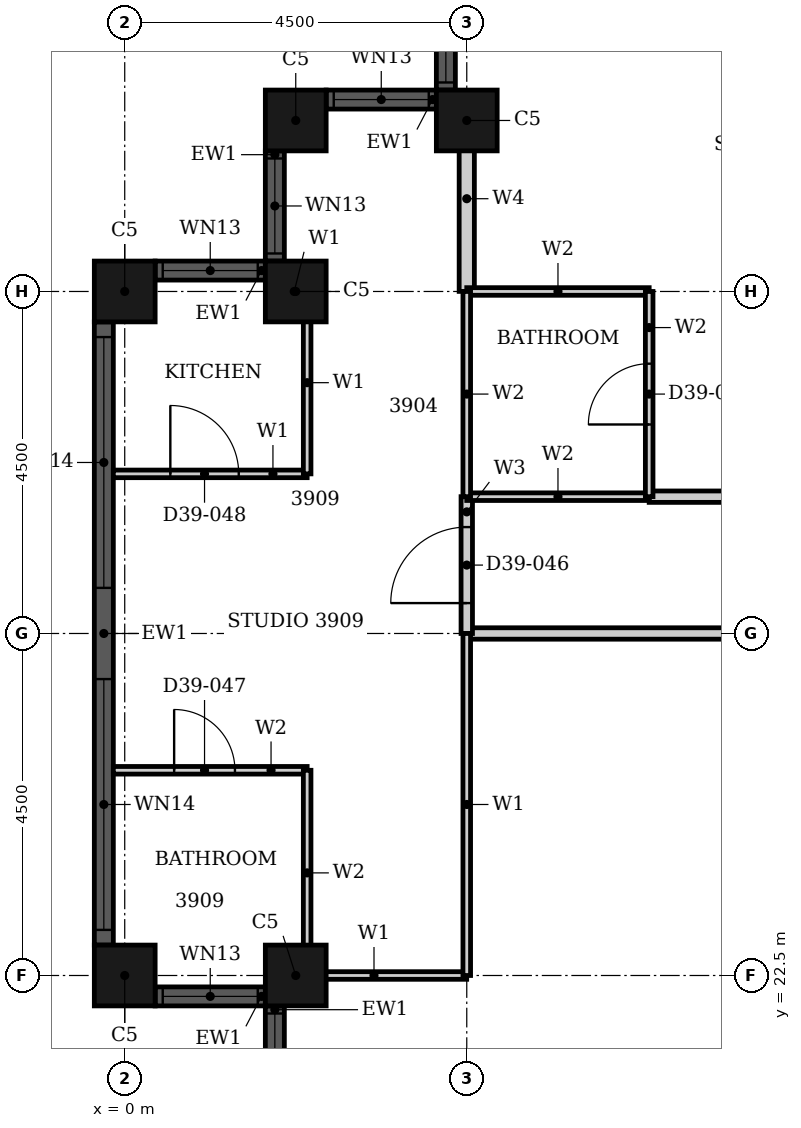
"""IFC4 building model, lengths in metres.
Left out: names, types, materials, properties, quantities, classifications, styles, units other than length and angle.
Written with IfcOpenShell. Run it as: python <this file> out.ifc"""

import sys

from ifc_helpers import new_model, si_unit, direction, frame, frame_2d, origin, origin_2d, place, context, subcontext, project, spatial, rectangle, hollow_rectangle, extrude, element, fill, save


model = new_model("IFC4")
c1 = context("Model", 3, precision=1e-05, world=origin(), true_north=direction((0.0, 1.0)))
c2 = subcontext(c1, "Body", "Model", "MODEL_VIEW")
j1 = project(units=[si_unit("LENGTHUNIT", "METRE"), si_unit("PLANEANGLEUNIT", "RADIAN")], contexts=[c1])
p1 = place(None, origin())
s1 = spatial("IfcSite", under=j1, at=p1, CompositionType="ELEMENT")
p2 = place(p1, origin())
s2 = spatial("IfcBuilding", under=s1, at=p2, CompositionType="ELEMENT")
p3 = place(p2, frame((0.0, 0.0, 158.0)))
s3 = spatial("IfcBuildingStorey", under=s2, at=p3, CompositionType="ELEMENT", Elevation=158.0)
for number, where, z_axis, x_axis in (
    (1, (4.5, 33.75, 0.0), (0.0, 0.0, 1.0), (1.0, 0.0, 0.0)),
    (2, (2.25, 33.75, 0.0), (0.0, 0.0, 1.0), (1.0, 0.0, 0.0)),
    (3, (2.25, 31.5, 0.0), (0.0, 0.0, 1.0), (1.0, 0.0, 0.0)),
    (4, (0.0, 31.5, 0.0), (0.0, 0.0, 1.0), (1.0, 0.0, 0.0)),
    (5, (0.0, 22.5, 0.0), (0.0, 0.0, 1.0), (1.0, 0.0, 0.0)),
    (6, (2.25, 22.5, 0.0), (0.0, 0.0, 1.0), (1.0, 0.0, 0.0)),
):
    element("IfcColumn", number, at=place(p3, frame(where, z_axis=z_axis, x_axis=x_axis)), inside=s3, PredefinedType="COLUMN", context=c2, shape_type="SweptSolid", body=[
        extrude(hollow_rectangle(XDim=0.8, YDim=0.8, WallThickness=0.025, at=origin_2d()), origin(), (0.0, 0.0, 1.0), 3.7),
    ])
p4 = place(p3, frame((4.225, 35.6, 0.0), z_axis=(0.0, 0.0, 1.0), x_axis=(0.0, -1.0, 0.0)))
e7 = element("IfcWall", 7, at=p4, inside=s3, PredefinedType="SOLIDWALL", context=c2, shape_type="SweptSolid", body=[
    extrude(rectangle(XDim=1.45, YDim=0.25, at=frame_2d((0.725, 0.0))), origin(), (0.0, 0.0, 1.0), 3.7),
])
p5 = place(p4, frame((0.1, 0.0, 0.9)))
e8 = element("IfcOpeningElement", 8, at=p5, cuts=e7, PredefinedType="OPENING", context=c2, shape_type="SweptSolid", body=[
    extrude(rectangle(XDim=1.25, YDim=2.08, at=frame_2d((0.625, 1.04))), frame((0.0, 0.135, 0.0), z_axis=(0.0, -1.0, 0.0), x_axis=(1.0, 0.0, 0.0)), (0.0, 0.0, 1.0), 0.27),
])
p6 = place(p3, frame((4.1, 34.025, 0.0), z_axis=(0.0, 0.0, 1.0), x_axis=(-1.0, 0.0, 0.0)))
e9 = element("IfcWall", 9, at=p6, inside=s3, PredefinedType="SOLIDWALL", context=c2, shape_type="SweptSolid", body=[
    extrude(rectangle(XDim=1.45, YDim=0.25, at=frame_2d((0.725, 0.0))), origin(), (0.0, 0.0, 1.0), 3.7),
])
p7 = place(p6, frame((0.1, 0.0, 0.9)))
e10 = element("IfcOpeningElement", 10, at=p7, cuts=e9, PredefinedType="OPENING", context=c2, shape_type="SweptSolid", body=[
    extrude(rectangle(XDim=1.25, YDim=1.85, at=frame_2d((0.625, 0.925))), frame((0.0, 0.135, 0.0), z_axis=(0.0, -1.0, 0.0), x_axis=(1.0, 0.0, 0.0)), (0.0, 0.0, 1.0), 0.27),
])
p8 = place(p3, frame((1.975, 33.35, 0.0), z_axis=(0.0, 0.0, 1.0), x_axis=(0.0, -1.0, 0.0)))
e11 = element("IfcWall", 11, at=p8, inside=s3, PredefinedType="SOLIDWALL", context=c2, shape_type="SweptSolid", body=[
    extrude(rectangle(XDim=1.45, YDim=0.25, at=frame_2d((0.725, 0.0))), origin(), (0.0, 0.0, 1.0), 3.7),
])
p9 = place(p8, frame((0.1, 0.0, 0.9)))
e12 = element("IfcOpeningElement", 12, at=p9, cuts=e11, PredefinedType="OPENING", context=c2, shape_type="SweptSolid", body=[
    extrude(rectangle(XDim=1.25, YDim=1.85, at=frame_2d((0.625, 0.925))), frame((0.0, 0.135, 0.0), z_axis=(0.0, -1.0, 0.0), x_axis=(1.0, 0.0, 0.0)), (0.0, 0.0, 1.0), 0.27),
])
p10 = place(p3, frame((1.85, 31.775, 0.0), z_axis=(0.0, 0.0, 1.0), x_axis=(-1.0, 0.0, 0.0)))
e13 = element("IfcWall", 13, at=p10, inside=s3, PredefinedType="SOLIDWALL", context=c2, shape_type="SweptSolid", body=[
    extrude(rectangle(XDim=1.45, YDim=0.25, at=frame_2d((0.725, 0.0))), origin(), (0.0, 0.0, 1.0), 3.7),
])
p11 = place(p10, frame((0.1, 0.0, 0.9)))
e14 = element("IfcOpeningElement", 14, at=p11, cuts=e13, PredefinedType="OPENING", context=c2, shape_type="SweptSolid", body=[
    extrude(rectangle(XDim=1.25, YDim=1.85, at=frame_2d((0.625, 0.925))), frame((0.0, 0.135, 0.0), z_axis=(0.0, -1.0, 0.0), x_axis=(1.0, 0.0, 0.0)), (0.0, 0.0, 1.0), 0.27),
])
p12 = place(p3, frame((-0.275, 31.1, 0.0), z_axis=(0.0, 0.0, 1.0), x_axis=(0.0, -1.0, 0.0)))
e15 = element("IfcWall", 15, at=p12, inside=s3, PredefinedType="SOLIDWALL", context=c2, shape_type="SweptSolid", body=[
    extrude(rectangle(XDim=8.2, YDim=0.25, at=frame_2d((4.1, 0.0))), origin(), (0.0, 0.0, 1.0), 3.7),
])
p13 = place(p12, frame((0.2, 0.0, 0.45)))
e16 = element("IfcOpeningElement", 16, at=p13, cuts=e15, PredefinedType="OPENING", context=c2, shape_type="SweptSolid", body=[
    extrude(rectangle(XDim=3.3, YDim=2.53, at=frame_2d((1.65, 1.265))), frame((0.0, 0.135, 0.0), z_axis=(0.0, -1.0, 0.0), x_axis=(1.0, 0.0, 0.0)), (0.0, 0.0, 1.0), 0.27),
])
p14 = place(p12, frame((4.7, 0.0, 0.45)))
e17 = element("IfcOpeningElement", 17, at=p14, cuts=e15, PredefinedType="OPENING", context=c2, shape_type="SweptSolid", body=[
    extrude(rectangle(XDim=3.3, YDim=2.53, at=frame_2d((1.65, 1.265))), frame((0.0, 0.135, 0.0), z_axis=(0.0, -1.0, 0.0), x_axis=(1.0, 0.0, 0.0)), (0.0, 0.0, 1.0), 0.27),
])
p15 = place(p3, frame((0.4, 22.225, 0.0), z_axis=(0.0, 0.0, 1.0), x_axis=(1.0, 0.0, 0.0)))
e18 = element("IfcWall", 18, at=p15, inside=s3, PredefinedType="SOLIDWALL", context=c2, shape_type="SweptSolid", body=[
    extrude(rectangle(XDim=1.45, YDim=0.25, at=frame_2d((0.725, 0.0))), origin(), (0.0, 0.0, 1.0), 3.7),
])
p16 = place(p15, frame((0.1, 0.0, 0.9)))
e19 = element("IfcOpeningElement", 19, at=p16, cuts=e18, PredefinedType="OPENING", context=c2, shape_type="SweptSolid", body=[
    extrude(rectangle(XDim=1.25, YDim=1.85, at=frame_2d((0.625, 0.925))), frame((0.0, 0.135, 0.0), z_axis=(0.0, -1.0, 0.0), x_axis=(1.0, 0.0, 0.0)), (0.0, 0.0, 1.0), 0.27),
])
p17 = place(p3, frame((1.975, 22.1, 0.0), z_axis=(0.0, 0.0, 1.0), x_axis=(0.0, -1.0, 0.0)))
e20 = element("IfcWall", 20, at=p17, inside=s3, PredefinedType="SOLIDWALL", context=c2, shape_type="SweptSolid", body=[
    extrude(rectangle(XDim=1.45, YDim=0.25, at=frame_2d((0.725, 0.0))), origin(), (0.0, 0.0, 1.0), 3.7),
])
p18 = place(p17, frame((0.1, 0.0, 0.9)))
e21 = element("IfcOpeningElement", 21, at=p18, cuts=e20, PredefinedType="OPENING", context=c2, shape_type="SweptSolid", body=[
    extrude(rectangle(XDim=1.25, YDim=1.85, at=frame_2d((0.625, 0.925))), frame((0.0, 0.135, 0.0), z_axis=(0.0, -1.0, 0.0), x_axis=(1.0, 0.0, 0.0)), (0.0, 0.0, 1.0), 0.27),
])
p19 = place(p3, frame((4.5, 27.0, 0.0), z_axis=(0.0, 0.0, 1.0), x_axis=(1.0, 0.0, 0.0)))
e22 = element("IfcWall", 22, at=p19, inside=s3, PredefinedType="PARTITIONING", context=c2, shape_type="SweptSolid", body=[
    extrude(rectangle(XDim=13.5, YDim=0.15, at=frame_2d((6.75, 0.0))), origin(), (0.0, 0.0, 1.0), 2.68),
])
p20 = place(p19, frame((5.35, 0.0, 0.0)))
e23 = element("IfcOpeningElement", 23, at=p20, cuts=e22, PredefinedType="OPENING", context=c2, shape_type="SweptSolid", body=[
    extrude(rectangle(XDim=1.0, YDim=2.1, at=frame_2d((0.5, 1.05))), frame((0.0, 0.085, 0.0), z_axis=(0.0, -1.0, 0.0), x_axis=(1.0, 0.0, 0.0)), (0.0, 0.0, 1.0), 0.17),
])
p21 = place(p3, frame((6.9, 28.8, 0.0), z_axis=(0.0, 0.0, 1.0), x_axis=(1.0, 0.0, 0.0)))
e24 = element("IfcWall", 24, at=p21, inside=s3, PredefinedType="PARTITIONING", context=c2, shape_type="SweptSolid", body=[
    extrude(rectangle(XDim=9.299, YDim=0.15, at=frame_2d((4.649, 0.0))), origin(), (0.0, 0.0, 1.0), 3.4),
])
p22 = place(p3, frame((4.5, 27.0, 0.0), z_axis=(0.0, 0.0, 1.0), x_axis=(0.0, 1.0, 0.0)))
e25 = element("IfcWall", 25, at=p22, inside=s3, PredefinedType="PARTITIONING", context=c2, shape_type="SweptSolid", body=[
    extrude(rectangle(XDim=1.8, YDim=0.15, at=frame_2d((0.9, 0.0))), origin(), (0.0, 0.0, 1.0), 3.4),
])
p23 = place(p22, frame((0.4, 0.0, 0.0)))
e26 = element("IfcOpeningElement", 26, at=p23, cuts=e25, PredefinedType="OPENING", context=c2, shape_type="SweptSolid", body=[
    extrude(rectangle(XDim=1.0, YDim=2.2, at=frame_2d((0.5, 1.1))), frame((0.0, 0.085, 0.0), z_axis=(0.0, -1.0, 0.0), x_axis=(1.0, 0.0, 0.0)), (0.0, 0.0, 1.0), 0.17),
])
p24 = place(p3, frame((2.06, 22.5, 0.0), z_axis=(0.0, 0.0, 1.0), x_axis=(1.0, 0.0, 0.0)))
e27 = element("IfcWall", 27, at=p24, inside=s3, PredefinedType="PARTITIONING", context=c2, shape_type="SweptSolid", body=[
    extrude(rectangle(XDim=2.439, YDim=0.1, at=frame_2d((1.219, 0.0))), origin(), (0.0, 0.0, 1.0), 2.68),
])
p25 = place(p3, frame((-0.15, 29.1, 0.0), z_axis=(0.0, 0.0, 1.0), x_axis=(1.0, 0.0, 0.0)))
e28 = element("IfcWall", 28, at=p25, inside=s3, PredefinedType="PARTITIONING", context=c2, shape_type="SweptSolid", body=[
    extrude(rectangle(XDim=2.55, YDim=0.1, at=frame_2d((1.275, 0.0))), origin(), (0.0, 0.0, 1.0), 3.4),
])
p26 = place(p25, frame((0.75, 0.0, 0.0)))
e29 = element("IfcOpeningElement", 29, at=p26, cuts=e28, PredefinedType="OPENING", context=c2, shape_type="SweptSolid", body=[
    extrude(rectangle(XDim=0.9, YDim=2.1, at=frame_2d((0.45, 1.05))), frame((0.0, 0.06, 0.0), z_axis=(0.0, -1.0, 0.0), x_axis=(1.0, 0.0, 0.0)), (0.0, 0.0, 1.0), 0.12),
])
p27 = place(p3, frame((2.06, 31.5, 0.0), z_axis=(0.0, 0.0, 1.0), x_axis=(1.0, 0.0, 0.0)))
e30 = element("IfcWall", 30, at=p27, inside=s3, PredefinedType="PARTITIONING", context=c2, shape_type="SweptSolid", body=[
    extrude(rectangle(XDim=0.34, YDim=0.1, at=frame_2d((0.17, 0.0))), origin(), (0.0, 0.0, 1.0), 3.4),
])
p28 = place(p3, frame((2.4, 29.1, 0.0), z_axis=(0.0, 0.0, 1.0), x_axis=(0.0, 1.0, 0.0)))
e31 = element("IfcWall", 31, at=p28, inside=s3, PredefinedType="PARTITIONING", context=c2, shape_type="SweptSolid", body=[
    extrude(rectangle(XDim=2.4, YDim=0.1, at=frame_2d((1.2, 0.0))), origin(), (0.0, 0.0, 1.0), 3.4),
])
p29 = place(p3, frame((4.5, 22.5, 0.0), z_axis=(0.0, 0.0, 1.0), x_axis=(0.0, 1.0, 0.0)))
e32 = element("IfcWall", 32, at=p29, inside=s3, PredefinedType="PARTITIONING", context=c2, shape_type="SweptSolid", body=[
    extrude(rectangle(XDim=4.5, YDim=0.1, at=frame_2d((2.25, 0.0))), origin(), (0.0, 0.0, 1.0), 3.4),
])
p30 = place(p3, frame((4.5, 31.501, 0.0), z_axis=(0.0, 0.0, 1.0), x_axis=(0.0, 1.0, 0.0)))
e33 = element("IfcWall", 33, at=p30, inside=s3, PredefinedType="PARTITIONING", context=c2, shape_type="SweptSolid", body=[
    extrude(rectangle(XDim=2.439, YDim=0.2, at=frame_2d((1.219, 0.0))), origin(), (0.0, 0.0, 1.0), 3.4),
])
p31 = place(p3, frame((-0.15, 25.2, 0.0), z_axis=(0.0, 0.0, 1.0), x_axis=(1.0, 0.0, 0.0)))
e34 = element("IfcWall", 34, at=p31, inside=s3, PredefinedType="PARTITIONING", context=c2, shape_type="SweptSolid", body=[
    extrude(rectangle(XDim=2.55, YDim=0.1, at=frame_2d((1.275, 0.0))), origin(), (0.0, 0.0, 1.0), 3.4),
])
p32 = place(p31, frame((0.8, 0.0, 0.0)))
e35 = element("IfcOpeningElement", 35, at=p32, cuts=e34, PredefinedType="OPENING", context=c2, shape_type="SweptSolid", body=[
    extrude(rectangle(XDim=0.8, YDim=2.1, at=frame_2d((0.4, 1.05))), frame((0.0, 0.06, 0.0), z_axis=(0.0, -1.0, 0.0), x_axis=(1.0, 0.0, 0.0)), (0.0, 0.0, 1.0), 0.12),
])
p33 = place(p3, frame((4.5, 28.8, 0.0), z_axis=(0.0, 0.0, 1.0), x_axis=(1.0, 0.0, 0.0)))
e36 = element("IfcWall", 36, at=p33, inside=s3, PredefinedType="PARTITIONING", context=c2, shape_type="SweptSolid", body=[
    extrude(rectangle(XDim=2.4, YDim=0.1, at=frame_2d((1.2, 0.0))), origin(), (0.0, 0.0, 1.0), 3.4),
])
p34 = place(p3, frame((4.5, 31.5, 0.0), z_axis=(0.0, 0.0, 1.0), x_axis=(1.0, 0.0, 0.0)))
e37 = element("IfcWall", 37, at=p34, inside=s3, PredefinedType="PARTITIONING", context=c2, shape_type="SweptSolid", body=[
    extrude(rectangle(XDim=2.4, YDim=0.1, at=frame_2d((1.2, 0.0))), origin(), (0.0, 0.0, 1.0), 2.68),
])
for number, where, z_axis, x_axis in (
    (38, (2.4, 22.5, 0.0), (0.0, 0.0, 1.0), (0.0, 1.0, 0.0)),
    (39, (4.5, 28.8, 0.0), (0.0, 0.0, 1.0), (0.0, 1.0, 0.0)),
):
    element("IfcWall", number, at=place(p3, frame(where, z_axis=z_axis, x_axis=x_axis)), inside=s3, PredefinedType="PARTITIONING", context=c2, shape_type="SweptSolid", body=[
        extrude(rectangle(XDim=2.7, YDim=0.1, at=frame_2d((1.35, 0.0))), origin(), (0.0, 0.0, 1.0), 3.4),
    ])
p35 = place(p3, frame((6.9, 28.8, 0.0), z_axis=(0.0, 0.0, 1.0), x_axis=(0.0, 1.0, 0.0)))
e40 = element("IfcWall", 40, at=p35, inside=s3, PredefinedType="PARTITIONING", context=c2, shape_type="SweptSolid", body=[
    extrude(rectangle(XDim=2.7, YDim=0.1, at=frame_2d((1.35, 0.0))), origin(), (0.0, 0.0, 1.0), 3.4),
])
p36 = place(p35, frame((0.95, 0.0, 0.0)))
e41 = element("IfcOpeningElement", 41, at=p36, cuts=e40, PredefinedType="OPENING", context=c2, shape_type="SweptSolid", body=[
    extrude(rectangle(XDim=0.8, YDim=2.1, at=frame_2d((0.4, 1.05))), frame((0.0, 0.06, 0.0), z_axis=(0.0, -1.0, 0.0), x_axis=(1.0, 0.0, 0.0)), (0.0, 0.0, 1.0), 0.12),
])
p37 = place(p5, origin())
e42 = element("IfcWindow", 42, at=p37, inside=s3, PartitioningType="SINGLE_PANEL", PredefinedType="WINDOW", context=c2, shape_type="SweptSolid", body=[
    extrude(rectangle(XDim=1.25, YDim=2.08, at=frame_2d((0.625, 1.04))), frame((0.0, 0.03, 0.0), z_axis=(0.0, -1.0, 0.0), x_axis=(1.0, 0.0, 0.0)), (0.0, 0.0, 1.0), 0.06),
])
fill(e8, e42)
p38 = place(p7, origin())
e43 = element("IfcWindow", 43, at=p38, inside=s3, PartitioningType="SINGLE_PANEL", PredefinedType="WINDOW", context=c2, shape_type="SweptSolid", body=[
    extrude(rectangle(XDim=1.25, YDim=1.85, at=frame_2d((0.625, 0.925))), frame((0.0, 0.03, 0.0), z_axis=(0.0, -1.0, 0.0), x_axis=(1.0, 0.0, 0.0)), (0.0, 0.0, 1.0), 0.06),
])
fill(e10, e43)
p39 = place(p9, origin())
e44 = element("IfcWindow", 44, at=p39, inside=s3, PartitioningType="SINGLE_PANEL", PredefinedType="WINDOW", context=c2, shape_type="SweptSolid", body=[
    extrude(rectangle(XDim=1.25, YDim=1.85, at=frame_2d((0.625, 0.925))), frame((0.0, 0.03, 0.0), z_axis=(0.0, -1.0, 0.0), x_axis=(1.0, 0.0, 0.0)), (0.0, 0.0, 1.0), 0.06),
])
fill(e12, e44)
p40 = place(p11, origin())
e45 = element("IfcWindow", 45, at=p40, inside=s3, PartitioningType="SINGLE_PANEL", PredefinedType="WINDOW", context=c2, shape_type="SweptSolid", body=[
    extrude(rectangle(XDim=1.25, YDim=1.85, at=frame_2d((0.625, 0.925))), frame((0.0, 0.03, 0.0), z_axis=(0.0, -1.0, 0.0), x_axis=(1.0, 0.0, 0.0)), (0.0, 0.0, 1.0), 0.06),
])
fill(e14, e45)
p41 = place(p13, origin())
e46 = element("IfcWindow", 46, at=p41, inside=s3, PartitioningType="SINGLE_PANEL", PredefinedType="WINDOW", context=c2, shape_type="SweptSolid", body=[
    extrude(rectangle(XDim=3.3, YDim=2.53, at=frame_2d((1.65, 1.265))), frame((0.0, 0.03, 0.0), z_axis=(0.0, -1.0, 0.0), x_axis=(1.0, 0.0, 0.0)), (0.0, 0.0, 1.0), 0.06),
])
fill(e16, e46)
p42 = place(p14, origin())
e47 = element("IfcWindow", 47, at=p42, inside=s3, PartitioningType="SINGLE_PANEL", PredefinedType="WINDOW", context=c2, shape_type="SweptSolid", body=[
    extrude(rectangle(XDim=3.3, YDim=2.53, at=frame_2d((1.65, 1.265))), frame((0.0, 0.03, 0.0), z_axis=(0.0, -1.0, 0.0), x_axis=(1.0, 0.0, 0.0)), (0.0, 0.0, 1.0), 0.06),
])
fill(e17, e47)
p43 = place(p16, origin())
e48 = element("IfcWindow", 48, at=p43, inside=s3, PartitioningType="SINGLE_PANEL", PredefinedType="WINDOW", context=c2, shape_type="SweptSolid", body=[
    extrude(rectangle(XDim=1.25, YDim=1.85, at=frame_2d((0.625, 0.925))), frame((0.0, 0.03, 0.0), z_axis=(0.0, -1.0, 0.0), x_axis=(1.0, 0.0, 0.0)), (0.0, 0.0, 1.0), 0.06),
])
fill(e19, e48)
p44 = place(p18, origin())
e49 = element("IfcWindow", 49, at=p44, inside=s3, PartitioningType="SINGLE_PANEL", PredefinedType="WINDOW", context=c2, shape_type="SweptSolid", body=[
    extrude(rectangle(XDim=1.25, YDim=1.85, at=frame_2d((0.625, 0.925))), frame((0.0, 0.03, 0.0), z_axis=(0.0, -1.0, 0.0), x_axis=(1.0, 0.0, 0.0)), (0.0, 0.0, 1.0), 0.06),
])
fill(e21, e49)
p45 = place(p36, origin())
e50 = element("IfcDoor", 50, at=p45, inside=s3, OperationType="SINGLE_SWING_RIGHT", PredefinedType="DOOR", context=c2, shape_type="SweptSolid", body=[
    extrude(rectangle(XDim=0.8, YDim=2.1, at=frame_2d((0.4, 1.05))), frame((0.0, 0.025, 0.0), z_axis=(0.0, -1.0, 0.0), x_axis=(1.0, 0.0, 0.0)), (0.0, 0.0, 1.0), 0.05),
])
fill(e41, e50)
p46 = place(p23, origin())
e51 = element("IfcDoor", 51, at=p46, inside=s3, OperationType="SINGLE_SWING_RIGHT", PredefinedType="DOOR", context=c2, shape_type="SweptSolid", body=[
    extrude(rectangle(XDim=1.0, YDim=2.2, at=frame_2d((0.5, 1.1))), frame((0.0, 0.025, 0.0), z_axis=(0.0, -1.0, 0.0), x_axis=(1.0, 0.0, 0.0)), (0.0, 0.0, 1.0), 0.05),
])
fill(e26, e51)
p47 = place(p32, origin())
e52 = element("IfcDoor", 52, at=p47, inside=s3, OperationType="SINGLE_SWING_RIGHT", PredefinedType="DOOR", context=c2, shape_type="SweptSolid", body=[
    extrude(rectangle(XDim=0.8, YDim=2.1, at=frame_2d((0.4, 1.05))), frame((0.0, 0.025, 0.0), z_axis=(0.0, -1.0, 0.0), x_axis=(1.0, 0.0, 0.0)), (0.0, 0.0, 1.0), 0.05),
])
fill(e35, e52)
p48 = place(p26, origin())
e53 = element("IfcDoor", 53, at=p48, inside=s3, OperationType="SINGLE_SWING_RIGHT", PredefinedType="DOOR", context=c2, shape_type="SweptSolid", body=[
    extrude(rectangle(XDim=0.9, YDim=2.1, at=frame_2d((0.45, 1.05))), frame((0.0, 0.025, 0.0), z_axis=(0.0, -1.0, 0.0), x_axis=(1.0, 0.0, 0.0)), (0.0, 0.0, 1.0), 0.05),
])
fill(e29, e53)
save(model, sys.argv[1])
